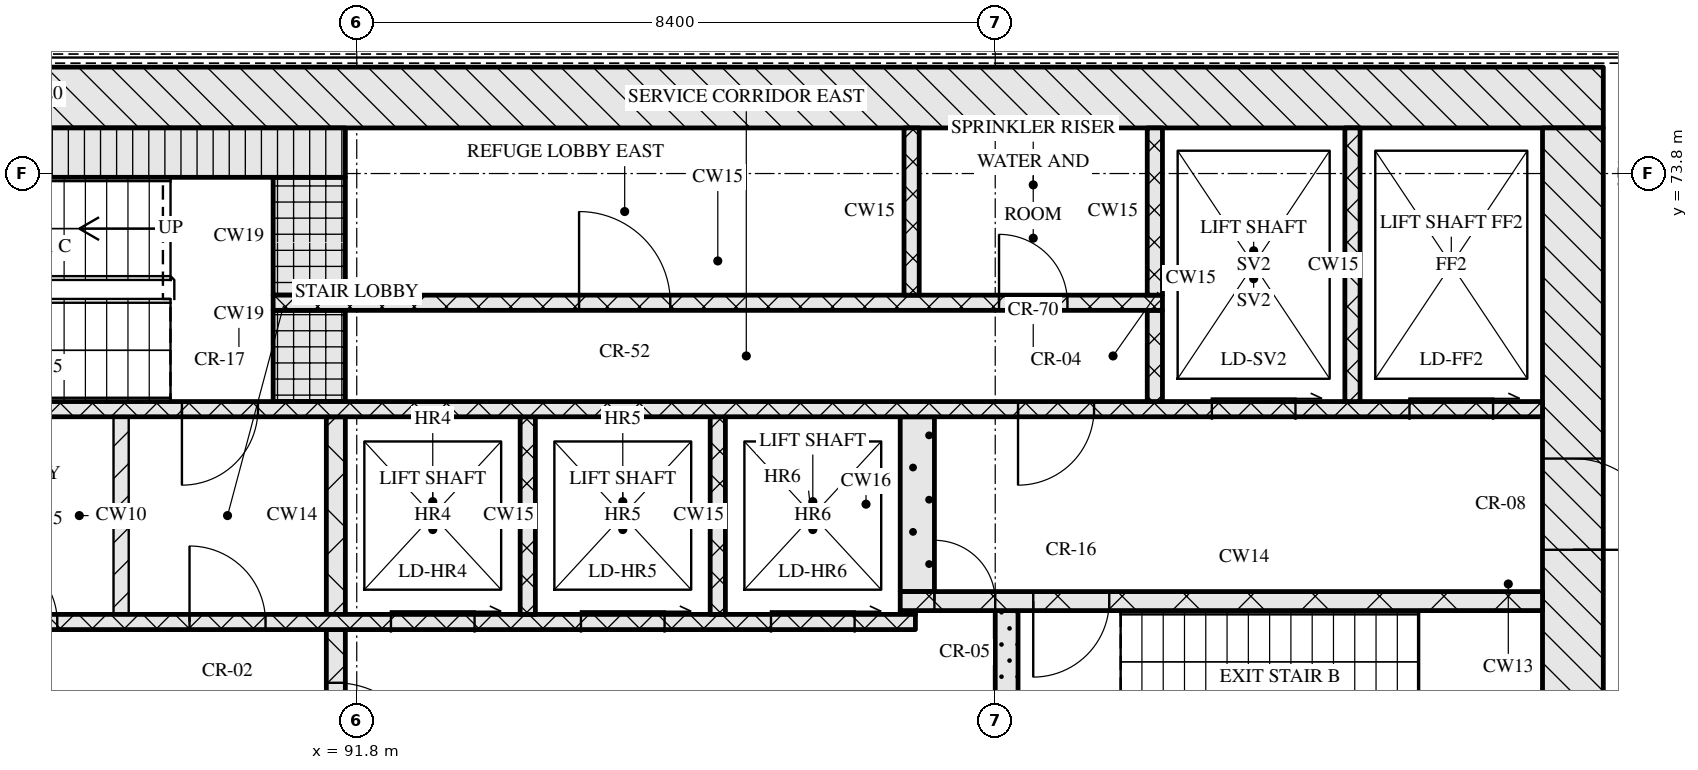
"""IFC4 building model, lengths in metres.
Left out: names, types, materials, properties, quantities, classifications, styles, units other than length and angle.
Written with IfcOpenShell. Run it as: python <this file> out.ifc"""

import sys

from ifc_helpers import new_model, si_unit, direction, frame, frame_2d, origin, place, context, subcontext, project, spatial, rectangle, extrude, element, fill, save


model = new_model("IFC4")
c1 = context("Model", 3, precision=1e-05, world=origin(), true_north=direction((0.0, 1.0)))
c2 = subcontext(c1, "Body", "Model", "MODEL_VIEW")
j1 = project(units=[si_unit("LENGTHUNIT", "METRE"), si_unit("PLANEANGLEUNIT", "RADIAN")], contexts=[c1])
p1 = place(None, origin())
s1 = spatial("IfcSite", under=j1, at=p1, CompositionType="ELEMENT")
p2 = place(p1, origin())
s2 = spatial("IfcBuilding", under=s1, at=p2, CompositionType="ELEMENT")
p3 = place(p2, frame((0.0, 0.0, 142.05)))
s3 = spatial("IfcBuildingStorey", under=s2, at=p3, CompositionType="ELEMENT", Elevation=142.05)
p4 = place(p3, frame((67.0, 74.8, 0.0), z_axis=(0.0, 0.0, 1.0), x_axis=(1.0, 0.0, 0.0)))
e1 = element("IfcWall", 1, at=p4, inside=s3, PredefinedType="SOLIDWALL", context=c2, shape_type="SweptSolid", body=[
    extrude(rectangle(XDim=41.2, YDim=0.8, at=frame_2d((20.6, 0.0))), origin(), (0.0, 0.0, 1.0), 5.12),
])
p5 = place(p3, frame((107.8, 62.4, 0.0), z_axis=(0.0, 0.0, 1.0), x_axis=(0.0, 1.0, 0.0)))
e2 = element("IfcWall", 2, at=p5, inside=s3, PredefinedType="SOLIDWALL", context=c2, shape_type="SweptSolid", body=[
    extrude(rectangle(XDim=12.0, YDim=0.8, at=frame_2d((6.0, 0.0))), origin(), (0.0, 0.0, 1.0), 5.12),
])
p6 = place(p5, frame((6.45, 0.0, 0.0)))
e3 = element("IfcOpeningElement", 3, at=p6, cuts=e2, PredefinedType="OPENING", context=c2, shape_type="SweptSolid", body=[
    extrude(rectangle(XDim=1.2, YDim=2.1, at=frame_2d((0.6, 1.05))), frame((0.0, 0.41, 0.0), z_axis=(0.0, -1.0, 0.0), x_axis=(1.0, 0.0, 0.0)), (0.0, 0.0, 1.0), 0.82),
])
p7 = place(p3, frame((91.525, 65.2, 0.0), z_axis=(0.0, 0.0, 1.0), x_axis=(0.0, 1.0, 0.0)))
e4 = element("IfcWall", 4, at=p7, inside=s3, PredefinedType="SOLIDWALL", context=c2, shape_type="SweptSolid", body=[
    extrude(rectangle(XDim=2.6, YDim=0.25, at=frame_2d((1.3, 0.0))), origin(), (0.0, 0.0, 1.0), 5.12),
])
p8 = place(p7, frame((0.7, 0.0, 0.0)))
e5 = element("IfcOpeningElement", 5, at=p8, cuts=e4, PredefinedType="OPENING", context=c2, shape_type="SweptSolid", body=[
    extrude(rectangle(XDim=1.2, YDim=2.1, at=frame_2d((0.6, 1.05))), frame((0.0, 0.135, 0.0), z_axis=(0.0, -1.0, 0.0), x_axis=(1.0, 0.0, 0.0)), (0.0, 0.0, 1.0), 0.27),
])
p9 = place(p3, frame((100.35, 65.2, 0.0), z_axis=(0.0, 0.0, 1.0), x_axis=(0.0, 1.0, 0.0)))
e6 = element("IfcWall", 6, at=p9, inside=s3, PredefinedType="SOLIDWALL", context=c2, shape_type="SweptSolid", body=[
    extrude(rectangle(XDim=2.85, YDim=0.3, at=frame_2d((1.425, 0.0))), origin(), (0.0, 0.0, 1.0), 5.12),
])
p10 = place(p3, frame((76.05, 67.9, 0.0), z_axis=(0.0, 0.0, 1.0), x_axis=(1.0, 0.0, 0.0)))
e7 = element("IfcWall", 7, at=p10, inside=s3, PredefinedType="SOLIDWALL", context=c2, shape_type="SweptSolid", body=[
    extrude(rectangle(XDim=23.1, YDim=0.2, at=frame_2d((11.55, 0.0))), origin(), (0.0, 0.0, 1.0), 5.12),
])
p11 = place(p10, frame((0.6, 0.0, 0.0)))
e8 = element("IfcOpeningElement", 8, at=p11, cuts=e7, PredefinedType="OPENING", context=c2, shape_type="SweptSolid", body=[
    extrude(rectangle(XDim=1.1, YDim=2.1, at=frame_2d((0.55, 1.05))), frame((0.0, 0.11, 0.0), z_axis=(0.0, -1.0, 0.0), x_axis=(1.0, 0.0, 0.0)), (0.0, 0.0, 1.0), 0.22),
])
p12 = place(p10, frame((3.1, 0.0, 0.0)))
e9 = element("IfcOpeningElement", 9, at=p12, cuts=e7, PredefinedType="OPENING", context=c2, shape_type="SweptSolid", body=[
    extrude(rectangle(XDim=1.1, YDim=2.1, at=frame_2d((0.55, 1.05))), frame((0.0, 0.11, 0.0), z_axis=(0.0, -1.0, 0.0), x_axis=(1.0, 0.0, 0.0)), (0.0, 0.0, 1.0), 0.22),
])
p13 = place(p10, frame((5.6, 0.0, 0.0)))
e10 = element("IfcOpeningElement", 10, at=p13, cuts=e7, PredefinedType="OPENING", context=c2, shape_type="SweptSolid", body=[
    extrude(rectangle(XDim=1.1, YDim=2.1, at=frame_2d((0.55, 1.05))), frame((0.0, 0.11, 0.0), z_axis=(0.0, -1.0, 0.0), x_axis=(1.0, 0.0, 0.0)), (0.0, 0.0, 1.0), 0.22),
])
p14 = place(p10, frame((8.45, 0.0, 0.0)))
e11 = element("IfcOpeningElement", 11, at=p14, cuts=e7, PredefinedType="OPENING", context=c2, shape_type="SweptSolid", body=[
    extrude(rectangle(XDim=0.9, YDim=2.1, at=frame_2d((0.45, 1.05))), frame((0.0, 0.11, 0.0), z_axis=(0.0, -1.0, 0.0), x_axis=(1.0, 0.0, 0.0)), (0.0, 0.0, 1.0), 0.22),
])
p15 = place(p10, frame((10.91, 0.0, 0.0)))
e12 = element("IfcOpeningElement", 12, at=p15, cuts=e7, PredefinedType="OPENING", context=c2, shape_type="SweptSolid", body=[
    extrude(rectangle(XDim=0.9, YDim=2.1, at=frame_2d((0.45, 1.05))), frame((0.0, 0.11, 0.0), z_axis=(0.0, -1.0, 0.0), x_axis=(1.0, 0.0, 0.0)), (0.0, 0.0, 1.0), 0.22),
])
p16 = place(p10, frame((13.55, 0.0, 0.0)))
e13 = element("IfcOpeningElement", 13, at=p16, cuts=e7, PredefinedType="OPENING", context=c2, shape_type="SweptSolid", body=[
    extrude(rectangle(XDim=1.0, YDim=2.1, at=frame_2d((0.5, 1.05))), frame((0.0, 0.11, 0.0), z_axis=(0.0, -1.0, 0.0), x_axis=(1.0, 0.0, 0.0)), (0.0, 0.0, 1.0), 0.22),
])
p17 = place(p10, frame((16.2, 0.0, 0.0)))
e14 = element("IfcOpeningElement", 14, at=p17, cuts=e7, PredefinedType="OPENING", context=c2, shape_type="SweptSolid", body=[
    extrude(rectangle(XDim=1.1, YDim=2.1, at=frame_2d((0.55, 1.05))), frame((0.0, 0.11, 0.0), z_axis=(0.0, -1.0, 0.0), x_axis=(1.0, 0.0, 0.0)), (0.0, 0.0, 1.0), 0.22),
])
p18 = place(p10, frame((18.7, 0.0, 0.0)))
e15 = element("IfcOpeningElement", 15, at=p18, cuts=e7, PredefinedType="OPENING", context=c2, shape_type="SweptSolid", body=[
    extrude(rectangle(XDim=1.1, YDim=2.1, at=frame_2d((0.55, 1.05))), frame((0.0, 0.11, 0.0), z_axis=(0.0, -1.0, 0.0), x_axis=(1.0, 0.0, 0.0)), (0.0, 0.0, 1.0), 0.22),
])
p19 = place(p10, frame((21.2, 0.0, 0.0)))
e16 = element("IfcOpeningElement", 16, at=p19, cuts=e7, PredefinedType="OPENING", context=c2, shape_type="SweptSolid", body=[
    extrude(rectangle(XDim=1.1, YDim=2.1, at=frame_2d((0.55, 1.05))), frame((0.0, 0.11, 0.0), z_axis=(0.0, -1.0, 0.0), x_axis=(1.0, 0.0, 0.0)), (0.0, 0.0, 1.0), 0.22),
])
p20 = place(p3, frame((88.7, 68.0, 0.0), z_axis=(0.0, 0.0, 1.0), x_axis=(0.0, 1.0, 0.0)))
e17 = element("IfcWall", 17, at=p20, inside=s3, PredefinedType="PARTITIONING", context=c2, shape_type="SweptSolid", body=[
    extrude(rectangle(XDim=2.6, YDim=0.2, at=frame_2d((1.3, 0.0))), origin(), (0.0, 0.0, 1.0), 5.12),
])
p21 = place(p3, frame((91.525, 68.0, 0.0), z_axis=(0.0, 0.0, 1.0), x_axis=(0.0, 1.0, 0.0)))
e18 = element("IfcWall", 18, at=p21, inside=s3, PredefinedType="SOLIDWALL", context=c2, shape_type="SweptSolid", body=[
    extrude(rectangle(XDim=2.6, YDim=0.25, at=frame_2d((1.3, 0.0))), origin(), (0.0, 0.0, 1.0), 5.12),
])
for number, where, z_axis, x_axis in (
    (19, (94.05, 68.0, 0.0), (0.0, 0.0, 1.0), (0.0, 1.0, 0.0)),
    (20, (96.55, 68.0, 0.0), (0.0, 0.0, 1.0), (0.0, 1.0, 0.0)),
):
    element("IfcWall", number, at=place(p3, frame(where, z_axis=z_axis, x_axis=x_axis)), inside=s3, PredefinedType="SOLIDWALL", context=c2, shape_type="SweptSolid", body=[
        extrude(rectangle(XDim=2.6, YDim=0.2, at=frame_2d((1.3, 0.0))), origin(), (0.0, 0.0, 1.0), 5.12),
    ])
p22 = place(p3, frame((98.95, 68.025, 0.0), z_axis=(0.0, 0.0, 1.0), x_axis=(1.0, 0.0, 0.0)))
e21 = element("IfcWall", 21, at=p22, inside=s3, PredefinedType="SOLIDWALL", context=c2, shape_type="SweptSolid", body=[
    extrude(rectangle(XDim=0.2, YDim=0.05, at=frame_2d((0.1, 0.0))), origin(), (0.0, 0.0, 1.0), 5.12),
])
p23 = place(p3, frame((98.95, 68.175, 0.0), z_axis=(0.0, 0.0, 1.0), x_axis=(1.0, 0.0, 0.0)))
e22 = element("IfcWall", 22, at=p23, inside=s3, PredefinedType="SOLIDWALL", context=c2, shape_type="SweptSolid", body=[
    extrude(rectangle(XDim=8.45, YDim=0.25, at=frame_2d((4.225, 0.0))), origin(), (0.0, 0.0, 1.0), 5.12),
])
p24 = place(p23, frame((0.45, 0.0, 0.0)))
e23 = element("IfcOpeningElement", 23, at=p24, cuts=e22, PredefinedType="OPENING", context=c2, shape_type="SweptSolid", body=[
    extrude(rectangle(XDim=0.8, YDim=2.1, at=frame_2d((0.4, 1.05))), frame((0.0, 0.135, 0.0), z_axis=(0.0, -1.0, 0.0), x_axis=(1.0, 0.0, 0.0)), (0.0, 0.0, 1.0), 0.27),
])
p25 = place(p23, frame((1.75, 0.0, 0.0)))
e24 = element("IfcOpeningElement", 24, at=p25, cuts=e22, PredefinedType="OPENING", context=c2, shape_type="SweptSolid", body=[
    extrude(rectangle(XDim=1.0, YDim=2.1, at=frame_2d((0.5, 1.05))), frame((0.0, 0.135, 0.0), z_axis=(0.0, -1.0, 0.0), x_axis=(1.0, 0.0, 0.0)), (0.0, 0.0, 1.0), 0.27),
])
p26 = place(p3, frame((99.175, 68.3, 0.0), z_axis=(0.0, 0.0, 1.0), x_axis=(0.0, 1.0, 0.0)))
e25 = element("IfcWall", 25, at=p26, inside=s3, PredefinedType="SOLIDWALL", context=c2, shape_type="SweptSolid", body=[
    extrude(rectangle(XDim=2.3, YDim=0.45, at=frame_2d((1.15, 0.0))), origin(), (0.0, 0.0, 1.0), 5.12),
])
p27 = place(p3, frame((67.8, 70.7, 0.0), z_axis=(0.0, 0.0, 1.0), x_axis=(1.0, 0.0, 0.0)))
e26 = element("IfcWall", 26, at=p27, inside=s3, PredefinedType="SOLIDWALL", context=c2, shape_type="SweptSolid", body=[
    extrude(rectangle(XDim=39.6, YDim=0.2, at=frame_2d((19.8, 0.0))), origin(), (0.0, 0.0, 1.0), 5.12),
])
p28 = place(p27, frame((0.65, 0.0, 0.0)))
e27 = element("IfcOpeningElement", 27, at=p28, cuts=e26, PredefinedType="OPENING", context=c2, shape_type="SweptSolid", body=[
    extrude(rectangle(XDim=1.1, YDim=2.1, at=frame_2d((0.55, 1.05))), frame((0.0, 0.11, 0.0), z_axis=(0.0, -1.0, 0.0), x_axis=(1.0, 0.0, 0.0)), (0.0, 0.0, 1.0), 0.22),
])
p29 = place(p27, frame((3.25, 0.0, 0.0)))
e28 = element("IfcOpeningElement", 28, at=p29, cuts=e26, PredefinedType="OPENING", context=c2, shape_type="SweptSolid", body=[
    extrude(rectangle(XDim=1.1, YDim=2.1, at=frame_2d((0.55, 1.05))), frame((0.0, 0.11, 0.0), z_axis=(0.0, -1.0, 0.0), x_axis=(1.0, 0.0, 0.0)), (0.0, 0.0, 1.0), 0.22),
])
p30 = place(p27, frame((5.9, 0.0, 0.0)))
e29 = element("IfcOpeningElement", 29, at=p30, cuts=e26, PredefinedType="OPENING", context=c2, shape_type="SweptSolid", body=[
    extrude(rectangle(XDim=1.0, YDim=2.1, at=frame_2d((0.5, 1.05))), frame((0.0, 0.11, 0.0), z_axis=(0.0, -1.0, 0.0), x_axis=(1.0, 0.0, 0.0)), (0.0, 0.0, 1.0), 0.22),
])
p31 = place(p27, frame((21.7, 0.0, 0.0)))
e30 = element("IfcOpeningElement", 30, at=p31, cuts=e26, PredefinedType="OPENING", context=c2, shape_type="SweptSolid", body=[
    extrude(rectangle(XDim=1.0, YDim=2.1, at=frame_2d((0.5, 1.05))), frame((0.0, 0.11, 0.0), z_axis=(0.0, -1.0, 0.0), x_axis=(1.0, 0.0, 0.0)), (0.0, 0.0, 1.0), 0.22),
])
p32 = place(p27, frame((32.7, 0.0, 0.0)))
e31 = element("IfcOpeningElement", 31, at=p32, cuts=e26, PredefinedType="OPENING", context=c2, shape_type="SweptSolid", body=[
    extrude(rectangle(XDim=1.0, YDim=2.1, at=frame_2d((0.5, 1.05))), frame((0.0, 0.11, 0.0), z_axis=(0.0, -1.0, 0.0), x_axis=(1.0, 0.0, 0.0)), (0.0, 0.0, 1.0), 0.22),
])
p33 = place(p27, frame((35.25, 0.0, 0.0)))
e32 = element("IfcOpeningElement", 32, at=p33, cuts=e26, PredefinedType="OPENING", context=c2, shape_type="SweptSolid", body=[
    extrude(rectangle(XDim=1.1, YDim=2.1, at=frame_2d((0.55, 1.05))), frame((0.0, 0.11, 0.0), z_axis=(0.0, -1.0, 0.0), x_axis=(1.0, 0.0, 0.0)), (0.0, 0.0, 1.0), 0.22),
])
p34 = place(p27, frame((37.85, 0.0, 0.0)))
e33 = element("IfcOpeningElement", 33, at=p34, cuts=e26, PredefinedType="OPENING", context=c2, shape_type="SweptSolid", body=[
    extrude(rectangle(XDim=1.1, YDim=2.1, at=frame_2d((0.55, 1.05))), frame((0.0, 0.11, 0.0), z_axis=(0.0, -1.0, 0.0), x_axis=(1.0, 0.0, 0.0)), (0.0, 0.0, 1.0), 0.22),
])
p35 = place(p3, frame((91.175, 70.8, 0.0), z_axis=(0.0, 0.0, 1.0), x_axis=(0.0, 1.0, 0.0)))
e34 = element("IfcWall", 34, at=p35, inside=s3, PredefinedType="SOLIDWALL", context=c2, shape_type="SweptSolid", body=[
    extrude(rectangle(XDim=1.2, YDim=0.95, at=frame_2d((0.6, 0.0))), origin(), (0.0, 0.0, 1.0), 5.12),
])
p36 = place(p3, frame((102.3, 70.8, 0.0), z_axis=(0.0, 0.0, 1.0), x_axis=(0.0, 1.0, 0.0)))
e35 = element("IfcWall", 35, at=p36, inside=s3, PredefinedType="SOLIDWALL", context=c2, shape_type="SweptSolid", body=[
    extrude(rectangle(XDim=1.2, YDim=0.2, at=frame_2d((0.6, 0.0))), origin(), (0.0, 0.0, 1.0), 5.12),
])
p37 = place(p3, frame((104.9, 70.8, 0.0), z_axis=(0.0, 0.0, 1.0), x_axis=(0.0, 1.0, 0.0)))
e36 = element("IfcWall", 36, at=p37, inside=s3, PredefinedType="SOLIDWALL", context=c2, shape_type="SweptSolid", body=[
    extrude(rectangle(XDim=3.6, YDim=0.2, at=frame_2d((1.8, 0.0))), origin(), (0.0, 0.0, 1.0), 5.12),
])
p38 = place(p3, frame((90.7, 72.1, 0.0), z_axis=(0.0, 0.0, 1.0), x_axis=(1.0, 0.0, 0.0)))
e37 = element("IfcWall", 37, at=p38, inside=s3, PredefinedType="SOLIDWALL", context=c2, shape_type="SweptSolid", body=[
    extrude(rectangle(XDim=11.7, YDim=0.2, at=frame_2d((5.85, 0.0))), origin(), (0.0, 0.0, 1.0), 5.12),
])
p39 = place(p38, frame((4.025, 0.0, 0.0)))
e38 = element("IfcOpeningElement", 38, at=p39, cuts=e37, PredefinedType="OPENING", context=c2, shape_type="SweptSolid", body=[
    extrude(rectangle(XDim=1.2, YDim=2.1, at=frame_2d((0.6, 1.05))), frame((0.0, 0.11, 0.0), z_axis=(0.0, -1.0, 0.0), x_axis=(1.0, 0.0, 0.0)), (0.0, 0.0, 1.0), 0.22),
])
p40 = place(p38, frame((9.55, 0.0, 0.0)))
e39 = element("IfcOpeningElement", 39, at=p40, cuts=e37, PredefinedType="OPENING", context=c2, shape_type="SweptSolid", body=[
    extrude(rectangle(XDim=0.9, YDim=2.1, at=frame_2d((0.45, 1.05))), frame((0.0, 0.11, 0.0), z_axis=(0.0, -1.0, 0.0), x_axis=(1.0, 0.0, 0.0)), (0.0, 0.0, 1.0), 0.22),
])
p41 = place(p3, frame((91.175, 72.2, 0.0), z_axis=(0.0, 0.0, 1.0), x_axis=(0.0, 1.0, 0.0)))
e40 = element("IfcWall", 40, at=p41, inside=s3, PredefinedType="SOLIDWALL", context=c2, shape_type="SweptSolid", body=[
    extrude(rectangle(XDim=1.55, YDim=0.95, at=frame_2d((0.775, 0.0))), origin(), (0.0, 0.0, 1.0), 5.12),
])
for number, where, z_axis, x_axis in (
    (41, (99.1, 72.2, 0.0), (0.0, 0.0, 1.0), (0.0, 1.0, 0.0)),
    (42, (102.3, 72.2, 0.0), (0.0, 0.0, 1.0), (0.0, 1.0, 0.0)),
):
    element("IfcWall", number, at=place(p3, frame(where, z_axis=z_axis, x_axis=x_axis)), inside=s3, PredefinedType="SOLIDWALL", context=c2, shape_type="SweptSolid", body=[
        extrude(rectangle(XDim=2.2, YDim=0.2, at=frame_2d((1.1, 0.0))), origin(), (0.0, 0.0, 1.0), 5.12),
    ])
p42 = place(p3, frame((83.55, 74.075, 0.0), z_axis=(0.0, 0.0, 1.0), x_axis=(1.0, 0.0, 0.0)))
e43 = element("IfcWall", 43, at=p42, inside=s3, PredefinedType="SOLIDWALL", context=c2, shape_type="SweptSolid", body=[
    extrude(rectangle(XDim=8.1, YDim=0.65, at=frame_2d((4.05, 0.0))), origin(), (0.0, 0.0, 1.0), 5.12),
])
p43 = place(p8, origin())
e44 = element("IfcDoor", 44, at=p43, inside=s3, OperationType="SINGLE_SWING_RIGHT", PredefinedType="DOOR", context=c2, shape_type="SweptSolid", body=[
    extrude(rectangle(XDim=1.2, YDim=2.1, at=frame_2d((0.6, 1.05))), frame((0.0, 0.025, 0.0), z_axis=(0.0, -1.0, 0.0), x_axis=(1.0, 0.0, 0.0)), (0.0, 0.0, 1.0), 0.05),
])
fill(e5, e44)
p44 = place(p15, origin())
e45 = element("IfcDoor", 45, at=p44, inside=s3, OperationType="SINGLE_SWING_LEFT", PredefinedType="DOOR", context=c2, shape_type="SweptSolid", body=[
    extrude(rectangle(XDim=0.9, YDim=2.1, at=frame_2d((0.45, 1.05))), frame((0.0, 0.025, 0.0), z_axis=(0.0, -1.0, 0.0), x_axis=(1.0, 0.0, 0.0)), (0.0, 0.0, 1.0), 0.05),
])
fill(e12, e45)
p45 = place(p16, origin())
e46 = element("IfcDoor", 46, at=p45, inside=s3, OperationType="SINGLE_SWING_LEFT", PredefinedType="DOOR", context=c2, shape_type="SweptSolid", body=[
    extrude(rectangle(XDim=1.0, YDim=2.1, at=frame_2d((0.5, 1.05))), frame((0.0, 0.025, 0.0), z_axis=(0.0, -1.0, 0.0), x_axis=(1.0, 0.0, 0.0)), (0.0, 0.0, 1.0), 0.05),
])
fill(e13, e46)
p46 = place(p17, origin())
e47 = element("IfcDoor", 47, at=p46, inside=s3, OperationType="SLIDING_TO_RIGHT", PredefinedType="DOOR", context=c2, shape_type="SweptSolid", body=[
    extrude(rectangle(XDim=1.1, YDim=2.1, at=frame_2d((0.55, 1.05))), frame((0.0, 0.025, 0.0), z_axis=(0.0, -1.0, 0.0), x_axis=(1.0, 0.0, 0.0)), (0.0, 0.0, 1.0), 0.05),
])
fill(e14, e47)
p47 = place(p18, origin())
e48 = element("IfcDoor", 48, at=p47, inside=s3, OperationType="SLIDING_TO_RIGHT", PredefinedType="DOOR", context=c2, shape_type="SweptSolid", body=[
    extrude(rectangle(XDim=1.1, YDim=2.1, at=frame_2d((0.55, 1.05))), frame((0.0, 0.025, 0.0), z_axis=(0.0, -1.0, 0.0), x_axis=(1.0, 0.0, 0.0)), (0.0, 0.0, 1.0), 0.05),
])
fill(e15, e48)
p48 = place(p19, origin())
e49 = element("IfcDoor", 49, at=p48, inside=s3, OperationType="SLIDING_TO_RIGHT", PredefinedType="DOOR", context=c2, shape_type="SweptSolid", body=[
    extrude(rectangle(XDim=1.1, YDim=2.1, at=frame_2d((0.55, 1.05))), frame((0.0, 0.025, 0.0), z_axis=(0.0, -1.0, 0.0), x_axis=(1.0, 0.0, 0.0)), (0.0, 0.0, 1.0), 0.05),
])
fill(e16, e49)
p49 = place(p24, origin())
e50 = element("IfcDoor", 50, at=p49, inside=s3, OperationType="SINGLE_SWING_LEFT", PredefinedType="DOOR", context=c2, shape_type="SweptSolid", body=[
    extrude(rectangle(XDim=0.8, YDim=2.1, at=frame_2d((0.4, 1.05))), frame((0.0, 0.025, 0.0), z_axis=(0.0, -1.0, 0.0), x_axis=(1.0, 0.0, 0.0)), (0.0, 0.0, 1.0), 0.05),
])
fill(e23, e50)
p50 = place(p25, origin())
e51 = element("IfcDoor", 51, at=p50, inside=s3, OperationType="SINGLE_SWING_RIGHT", PredefinedType="DOOR", context=c2, shape_type="SweptSolid", body=[
    extrude(rectangle(XDim=1.0, YDim=2.1, at=frame_2d((0.5, 1.05))), frame((0.0, 0.025, 0.0), z_axis=(0.0, -1.0, 0.0), x_axis=(1.0, 0.0, 0.0)), (0.0, 0.0, 1.0), 0.05),
])
fill(e24, e51)
p51 = place(p6, origin())
e52 = element("IfcDoor", 52, at=p51, inside=s3, OperationType="SINGLE_SWING_RIGHT", PredefinedType="DOOR", context=c2, shape_type="SweptSolid", body=[
    extrude(rectangle(XDim=1.2, YDim=2.1, at=frame_2d((0.6, 1.05))), frame((0.0, 0.025, 0.0), z_axis=(0.0, -1.0, 0.0), x_axis=(1.0, 0.0, 0.0)), (0.0, 0.0, 1.0), 0.05),
])
fill(e3, e52)
p52 = place(p31, origin())
e53 = element("IfcDoor", 53, at=p52, inside=s3, OperationType="SINGLE_SWING_RIGHT", PredefinedType="DOOR", context=c2, shape_type="SweptSolid", body=[
    extrude(rectangle(XDim=1.0, YDim=2.1, at=frame_2d((0.5, 1.05))), frame((0.0, 0.025, 0.0), z_axis=(0.0, -1.0, 0.0), x_axis=(1.0, 0.0, 0.0)), (0.0, 0.0, 1.0), 0.05),
])
fill(e30, e53)
p53 = place(p32, origin())
e54 = element("IfcDoor", 54, at=p53, inside=s3, OperationType="SINGLE_SWING_RIGHT", PredefinedType="DOOR", context=c2, shape_type="SweptSolid", body=[
    extrude(rectangle(XDim=1.0, YDim=2.1, at=frame_2d((0.5, 1.05))), frame((0.0, 0.025, 0.0), z_axis=(0.0, -1.0, 0.0), x_axis=(1.0, 0.0, 0.0)), (0.0, 0.0, 1.0), 0.05),
])
fill(e31, e54)
p54 = place(p33, origin())
e55 = element("IfcDoor", 55, at=p54, inside=s3, OperationType="SLIDING_TO_RIGHT", PredefinedType="DOOR", context=c2, shape_type="SweptSolid", body=[
    extrude(rectangle(XDim=1.1, YDim=2.1, at=frame_2d((0.55, 1.05))), frame((0.0, 0.025, 0.0), z_axis=(0.0, -1.0, 0.0), x_axis=(1.0, 0.0, 0.0)), (0.0, 0.0, 1.0), 0.05),
])
fill(e32, e55)
p55 = place(p34, origin())
e56 = element("IfcDoor", 56, at=p55, inside=s3, OperationType="SLIDING_TO_RIGHT", PredefinedType="DOOR", context=c2, shape_type="SweptSolid", body=[
    extrude(rectangle(XDim=1.1, YDim=2.1, at=frame_2d((0.55, 1.05))), frame((0.0, 0.025, 0.0), z_axis=(0.0, -1.0, 0.0), x_axis=(1.0, 0.0, 0.0)), (0.0, 0.0, 1.0), 0.05),
])
fill(e33, e56)
p56 = place(p39, origin())
e57 = element("IfcDoor", 57, at=p56, inside=s3, OperationType="SINGLE_SWING_LEFT", PredefinedType="DOOR", context=c2, shape_type="SweptSolid", body=[
    extrude(rectangle(XDim=1.2, YDim=2.1, at=frame_2d((0.6, 1.05))), frame((0.0, 0.025, 0.0), z_axis=(0.0, -1.0, 0.0), x_axis=(1.0, 0.0, 0.0)), (0.0, 0.0, 1.0), 0.05),
])
fill(e38, e57)
p57 = place(p40, origin())
e58 = element("IfcDoor", 58, at=p57, inside=s3, OperationType="SINGLE_SWING_LEFT", PredefinedType="DOOR", context=c2, shape_type="SweptSolid", body=[
    extrude(rectangle(XDim=0.9, YDim=2.1, at=frame_2d((0.45, 1.05))), frame((0.0, 0.025, 0.0), z_axis=(0.0, -1.0, 0.0), x_axis=(1.0, 0.0, 0.0)), (0.0, 0.0, 1.0), 0.05),
])
fill(e39, e58)
save(model, sys.argv[1])
